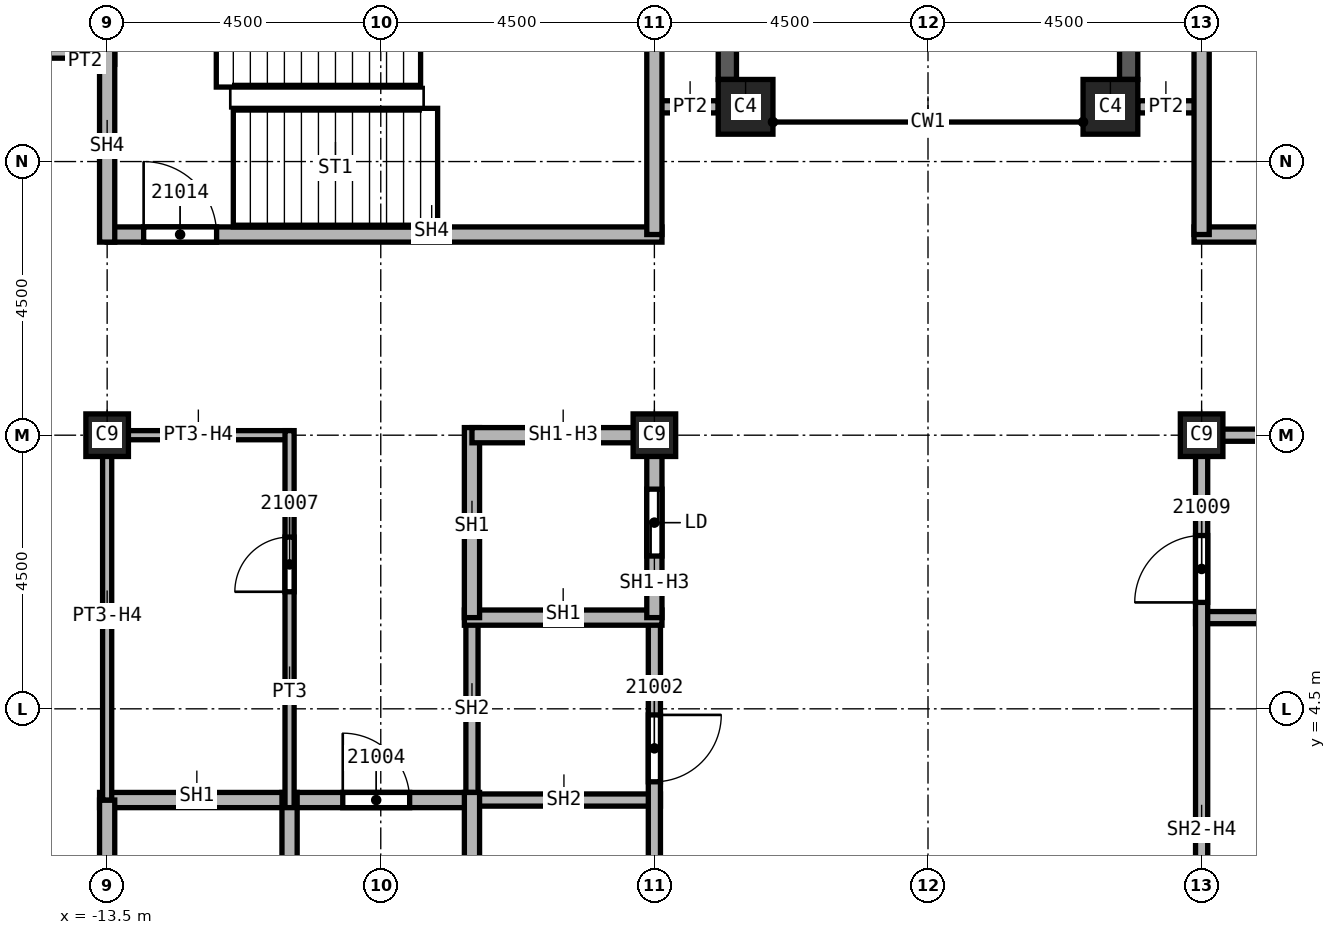
"""IFC4 building model, lengths in metres.
Left out: names, types, materials, properties, quantities, classifications, styles, units other than length and angle.
Written with IfcOpenShell. Run it as: python <this file> out.ifc"""

import sys

from ifc_helpers import new_model, si_unit, direction, frame, frame_2d, origin, origin_2d, place, context, subcontext, project, spatial, rectangle, extrude, element, fill, save


model = new_model("IFC4")
c1 = context("Model", 3, precision=1e-05, world=origin(), true_north=direction((0.0, 1.0)))
c2 = subcontext(c1, "Body", "Model", "MODEL_VIEW")
j1 = project(units=[si_unit("LENGTHUNIT", "METRE"), si_unit("PLANEANGLEUNIT", "RADIAN")], contexts=[c1])
p1 = place(None, origin())
s1 = spatial("IfcSite", under=j1, at=p1, CompositionType="ELEMENT")
p2 = place(p1, origin())
s2 = spatial("IfcBuilding", under=s1, at=p2, CompositionType="ELEMENT")
p3 = place(p2, frame((0.0, 0.0, 308.0)))
s3 = spatial("IfcBuildingStorey", under=s2, at=p3, CompositionType="ELEMENT", Elevation=308.0)
for number, where, z_axis, x_axis in (
    (1, (4.5, 9.0, 0.0), (0.0, 0.0, 1.0), (1.0, 0.0, 0.0)),
    (2, (-4.5, 9.0, 0.0), (0.0, 0.0, 1.0), (1.0, 0.0, 0.0)),
    (3, (-13.5, 9.0, 0.0), (0.0, 0.0, 1.0), (1.0, 0.0, 0.0)),
):
    element("IfcColumn", number, at=place(p3, frame(where, z_axis=z_axis, x_axis=x_axis)), inside=s3, PredefinedType="COLUMN", context=c2, shape_type="SweptSolid", body=[
        extrude(rectangle(XDim=0.7, YDim=0.7, at=origin_2d()), origin(), (0.0, 0.0, 1.0), 3.74),
    ])
for number, where, z_axis, x_axis in (
    (4, (3.0, 14.4, 0.0), (0.0, 0.0, 1.0), (1.0, 0.0, 0.0)),
    (5, (-3.0, 14.4, 0.0), (0.0, 0.0, 1.0), (1.0, 0.0, 0.0)),
):
    element("IfcColumn", number, at=place(p3, frame(where, z_axis=z_axis, x_axis=x_axis)), inside=s3, PredefinedType="COLUMN", context=c2, shape_type="SweptSolid", body=[
        extrude(rectangle(XDim=0.9, YDim=0.9, at=origin_2d()), origin(), (0.0, 0.0, 1.0), 3.74),
    ])
p4 = place(p3, frame((3.3, 22.95, 0.0), z_axis=(0.0, 0.0, 1.0), x_axis=(0.0, -1.0, 0.0)))
e6 = element("IfcWall", 6, at=p4, inside=s3, PredefinedType="SOLIDWALL", context=c2, shape_type="SweptSolid", body=[
    extrude(rectangle(XDim=8.1, YDim=0.3, at=frame_2d((4.05, 0.0))), origin(), (0.0, 0.0, 1.0), 3.14),
])
p5 = place(p4, frame((0.825, 0.0, 0.8)))
e7 = element("IfcOpeningElement", 7, at=p5, cuts=e6, PredefinedType="OPENING", context=c2, shape_type="SweptSolid", body=[
    extrude(rectangle(XDim=2.4, YDim=1.95, at=frame_2d((1.2, 0.975))), frame((0.0, 0.15, 0.0), z_axis=(0.0, -1.0, 0.0), x_axis=(1.0, 0.0, 0.0)), (0.0, 0.0, 1.0), 0.3),
])
p6 = place(p4, frame((4.875, 0.0, 0.8)))
e8 = element("IfcOpeningElement", 8, at=p6, cuts=e6, PredefinedType="OPENING", context=c2, shape_type="SweptSolid", body=[
    extrude(rectangle(XDim=2.4, YDim=1.95, at=frame_2d((1.2, 0.975))), frame((0.0, 0.15, 0.0), z_axis=(0.0, -1.0, 0.0), x_axis=(1.0, 0.0, 0.0)), (0.0, 0.0, 1.0), 0.3),
])
p7 = place(p3, frame((-3.3, 14.85, 0.0), z_axis=(0.0, 0.0, 1.0), x_axis=(0.0, 1.0, 0.0)))
e9 = element("IfcWall", 9, at=p7, inside=s3, PredefinedType="SOLIDWALL", context=c2, shape_type="SweptSolid", body=[
    extrude(rectangle(XDim=8.1, YDim=0.3, at=frame_2d((4.05, 0.0))), origin(), (0.0, 0.0, 1.0), 3.14),
])
p8 = place(p7, frame((0.825, 0.0, 0.8)))
e10 = element("IfcOpeningElement", 10, at=p8, cuts=e9, PredefinedType="OPENING", context=c2, shape_type="SweptSolid", body=[
    extrude(rectangle(XDim=2.4, YDim=1.95, at=frame_2d((1.2, 0.975))), frame((0.0, 0.15, 0.0), z_axis=(0.0, -1.0, 0.0), x_axis=(1.0, 0.0, 0.0)), (0.0, 0.0, 1.0), 0.3),
])
p9 = place(p7, frame((4.875, 0.0, 0.8)))
e11 = element("IfcOpeningElement", 11, at=p9, cuts=e9, PredefinedType="OPENING", context=c2, shape_type="SweptSolid", body=[
    extrude(rectangle(XDim=2.4, YDim=1.95, at=frame_2d((1.2, 0.975))), frame((0.0, 0.15, 0.0), z_axis=(0.0, -1.0, 0.0), x_axis=(1.0, 0.0, 0.0)), (0.0, 0.0, 1.0), 0.3),
])
p10 = place(p3, frame((-14.1, 15.2, 0.0), z_axis=(0.0, 0.0, 1.0), x_axis=(1.0, 0.0, 0.0)))
e12 = element("IfcWall", 12, at=p10, inside=s3, PredefinedType="PARTITIONING", context=c2, shape_type="SweptSolid", body=[
    extrude(rectangle(XDim=0.725, YDim=0.2, at=frame_2d((0.363, 0.0))), origin(), (0.0, 0.0, 1.0), 3.74),
])
for number, where, z_axis, x_axis in (
    (13, (-4.5, 14.4, 0.0), (0.0, 0.0, 1.0), (1.0, 0.0, 0.0)),
    (14, (3.45, 14.4, 0.0), (0.0, 0.0, 1.0), (1.0, 0.0, 0.0)),
):
    element("IfcWall", number, at=place(p3, frame(where, z_axis=z_axis, x_axis=x_axis)), inside=s3, PredefinedType="PARTITIONING", context=c2, shape_type="SweptSolid", body=[
        extrude(rectangle(XDim=1.05, YDim=0.2, at=frame_2d((0.525, 0.0))), origin(), (0.0, 0.0, 1.0), 3.74),
    ])
p11 = place(p3, frame((-7.625, 3.0, 0.0), z_axis=(0.0, 0.0, 1.0), x_axis=(1.0, 0.0, 0.0)))
e15 = element("IfcWall", 15, at=p11, inside=s3, PredefinedType="SOLIDWALL", context=c2, shape_type="SweptSolid", body=[
    extrude(rectangle(XDim=3.225, YDim=0.2, at=frame_2d((1.613, 0.0))), origin(), (0.0, 0.0, 1.0), 3.74),
])
p12 = place(p3, frame((-7.5, 2.875, 0.0), z_axis=(0.0, 0.0, 1.0), x_axis=(0.0, 1.0, 0.0)))
e16 = element("IfcWall", 16, at=p12, inside=s3, PredefinedType="SOLIDWALL", context=c2, shape_type="SweptSolid", body=[
    extrude(rectangle(XDim=3.125, YDim=0.2, at=frame_2d((1.562, 0.0))), origin(), (0.0, 0.0, 1.0), 3.74),
])
p13 = place(p3, frame((-4.5, 6.0, 0.0), z_axis=(0.0, 0.0, 1.0), x_axis=(0.0, -1.0, 0.0)))
e17 = element("IfcWall", 17, at=p13, inside=s3, PredefinedType="SOLIDWALL", context=c2, shape_type="SweptSolid", body=[
    extrude(rectangle(XDim=15.1, YDim=0.2, at=frame_2d((7.55, 0.0))), origin(), (0.0, 0.0, 1.0), 3.062),
])
p14 = place(p13, frame((6.85, 0.0, 0.0)))
e18 = element("IfcOpeningElement", 18, at=p14, cuts=e17, PredefinedType="OPENING", context=c2, shape_type="SweptSolid", body=[
    extrude(rectangle(XDim=1.1, YDim=2.1, at=frame_2d((0.55, 1.05))), frame((0.0, 0.1, 0.0), z_axis=(0.0, -1.0, 0.0), x_axis=(1.0, 0.0, 0.0)), (0.0, 0.0, 1.0), 0.2),
])
p15 = place(p13, frame((1.6, 0.0, 0.0)))
e19 = element("IfcOpeningElement", 19, at=p15, cuts=e17, PredefinedType="OPENING", context=c2, shape_type="SweptSolid", body=[
    extrude(rectangle(XDim=1.1, YDim=2.1, at=frame_2d((0.55, 1.05))), frame((0.0, 0.1, 0.0), z_axis=(0.0, -1.0, 0.0), x_axis=(1.0, 0.0, 0.0)), (0.0, 0.0, 1.0), 0.2),
])
p16 = place(p3, frame((4.4, 6.0, 0.0), z_axis=(0.0, 0.0, 1.0), x_axis=(1.0, 0.0, 0.0)))
e20 = element("IfcWall", 20, at=p16, inside=s3, PredefinedType="SOLIDWALL", context=c2, shape_type="SweptSolid", body=[
    extrude(rectangle(XDim=3.2, YDim=0.2, at=frame_2d((1.6, 0.0))), origin(), (0.0, 0.0, 1.0), 3.74),
])
p17 = place(p3, frame((4.5, -6.0, 0.0), z_axis=(0.0, 0.0, 1.0), x_axis=(0.0, 1.0, 0.0)))
e21 = element("IfcWall", 21, at=p17, inside=s3, PredefinedType="SOLIDWALL", context=c2, shape_type="SweptSolid", body=[
    extrude(rectangle(XDim=15.1, YDim=0.2, at=frame_2d((7.55, 0.0))), origin(), (0.0, 0.0, 1.0), 3.062),
])
p18 = place(p17, frame((4.0, 0.0, 0.0)))
e22 = element("IfcOpeningElement", 22, at=p18, cuts=e21, PredefinedType="OPENING", context=c2, shape_type="SweptSolid", body=[
    extrude(rectangle(XDim=1.1, YDim=2.1, at=frame_2d((0.55, 1.05))), frame((0.0, 0.1, 0.0), z_axis=(0.0, -1.0, 0.0), x_axis=(1.0, 0.0, 0.0)), (0.0, 0.0, 1.0), 0.2),
])
p19 = place(p17, frame((12.25, 0.0, 0.0)))
e23 = element("IfcOpeningElement", 23, at=p19, cuts=e21, PredefinedType="OPENING", context=c2, shape_type="SweptSolid", body=[
    extrude(rectangle(XDim=1.1, YDim=2.1, at=frame_2d((0.55, 1.05))), frame((0.0, 0.1, 0.0), z_axis=(0.0, -1.0, 0.0), x_axis=(1.0, 0.0, 0.0)), (0.0, 0.0, 1.0), 0.2),
])
p20 = place(p3, frame((4.5, 9.0, 0.0), z_axis=(0.0, 0.0, 1.0), x_axis=(1.0, 0.0, 0.0)))
e24 = element("IfcWall", 24, at=p20, inside=s3, PredefinedType="SOLIDWALL", context=c2, shape_type="SweptSolid", body=[
    extrude(rectangle(XDim=3.0, YDim=0.2, at=frame_2d((1.5, 0.0))), origin(), (0.0, 0.0, 1.0), 3.062),
])
p21 = place(p3, frame((-13.625, 3.0, 0.0), z_axis=(0.0, 0.0, 1.0), x_axis=(1.0, 0.0, 0.0)))
e25 = element("IfcWall", 25, at=p21, inside=s3, PredefinedType="SOLIDWALL", context=c2, shape_type="SweptSolid", body=[
    extrude(rectangle(XDim=6.125, YDim=0.25, at=frame_2d((3.062, 0.0))), origin(), (0.0, 0.0, 1.0), 3.74),
])
p22 = place(p21, frame((4.0, 0.0, 0.0)))
e26 = element("IfcOpeningElement", 26, at=p22, cuts=e25, PredefinedType="OPENING", context=c2, shape_type="SweptSolid", body=[
    extrude(rectangle(XDim=1.1, YDim=2.1, at=frame_2d((0.55, 1.05))), frame((0.0, 0.125, 0.0), z_axis=(0.0, -1.0, 0.0), x_axis=(1.0, 0.0, 0.0)), (0.0, 0.0, 1.0), 0.25),
])
p23 = place(p3, frame((-13.5, -3.0, 0.0), z_axis=(0.0, 0.0, 1.0), x_axis=(0.0, 1.0, 0.0)))
e27 = element("IfcWall", 27, at=p23, inside=s3, PredefinedType="SOLIDWALL", context=c2, shape_type="SweptSolid", body=[
    extrude(rectangle(XDim=6.0, YDim=0.25, at=frame_2d((3.0, 0.0))), origin(), (0.0, 0.0, 1.0), 3.062),
])
p24 = place(p3, frame((-10.5, -3.125, 0.0), z_axis=(0.0, 0.0, 1.0), x_axis=(0.0, 1.0, 0.0)))
e28 = element("IfcWall", 28, at=p24, inside=s3, PredefinedType="SOLIDWALL", context=c2, shape_type="SweptSolid", body=[
    extrude(rectangle(XDim=6.25, YDim=0.25, at=frame_2d((3.125, 0.0))), origin(), (0.0, 0.0, 1.0), 3.74),
])
p25 = place(p24, frame((1.075, 0.0, 0.0)))
e29 = element("IfcOpeningElement", 29, at=p25, cuts=e28, PredefinedType="OPENING", context=c2, shape_type="SweptSolid", body=[
    extrude(rectangle(XDim=1.1, YDim=2.1, at=frame_2d((0.55, 1.05))), frame((0.0, 0.125, 0.0), z_axis=(0.0, -1.0, 0.0), x_axis=(1.0, 0.0, 0.0)), (0.0, 0.0, 1.0), 0.25),
])
p26 = place(p24, frame((4.075, 0.0, 0.0)))
e30 = element("IfcOpeningElement", 30, at=p26, cuts=e28, PredefinedType="OPENING", context=c2, shape_type="SweptSolid", body=[
    extrude(rectangle(XDim=1.1, YDim=2.1, at=frame_2d((0.55, 1.05))), frame((0.0, 0.125, 0.0), z_axis=(0.0, -1.0, 0.0), x_axis=(1.0, 0.0, 0.0)), (0.0, 0.0, 1.0), 0.25),
])
p27 = place(p3, frame((-7.625, 6.0, 0.0), z_axis=(0.0, 0.0, 1.0), x_axis=(1.0, 0.0, 0.0)))
e31 = element("IfcWall", 31, at=p27, inside=s3, PredefinedType="SOLIDWALL", context=c2, shape_type="SweptSolid", body=[
    extrude(rectangle(XDim=3.25, YDim=0.25, at=frame_2d((1.625, 0.0))), origin(), (0.0, 0.0, 1.0), 3.74),
])
p28 = place(p3, frame((-7.5, -3.125, 0.0), z_axis=(0.0, 0.0, 1.0), x_axis=(0.0, 1.0, 0.0)))
e32 = element("IfcWall", 32, at=p28, inside=s3, PredefinedType="SOLIDWALL", context=c2, shape_type="SweptSolid", body=[
    extrude(rectangle(XDim=6.25, YDim=0.25, at=frame_2d((3.125, 0.0))), origin(), (0.0, 0.0, 1.0), 3.74),
])
p29 = place(p3, frame((-7.5, 6.0, 0.0), z_axis=(0.0, 0.0, 1.0), x_axis=(0.0, 1.0, 0.0)))
e33 = element("IfcWall", 33, at=p29, inside=s3, PredefinedType="SOLIDWALL", context=c2, shape_type="SweptSolid", body=[
    extrude(rectangle(XDim=3.125, YDim=0.25, at=frame_2d((1.562, 0.0))), origin(), (0.0, 0.0, 1.0), 3.74),
])
p30 = place(p3, frame((-7.5, 9.0, 0.0), z_axis=(0.0, 0.0, 1.0), x_axis=(1.0, 0.0, 0.0)))
e34 = element("IfcWall", 34, at=p30, inside=s3, PredefinedType="SOLIDWALL", context=c2, shape_type="SweptSolid", body=[
    extrude(rectangle(XDim=3.0, YDim=0.25, at=frame_2d((1.5, 0.0))), origin(), (0.0, 0.0, 1.0), 3.062),
])
p31 = place(p3, frame((-4.5, 9.125, 0.0), z_axis=(0.0, 0.0, 1.0), x_axis=(0.0, -1.0, 0.0)))
e35 = element("IfcWall", 35, at=p31, inside=s3, PredefinedType="SOLIDWALL", context=c2, shape_type="SweptSolid", body=[
    extrude(rectangle(XDim=3.125, YDim=0.25, at=frame_2d((1.562, 0.0))), origin(), (0.0, 0.0, 1.0), 3.062),
])
p32 = place(p31, frame((1.012, 0.0, 0.0)))
e36 = element("IfcOpeningElement", 36, at=p32, cuts=e35, PredefinedType="OPENING", context=c2, shape_type="SweptSolid", body=[
    extrude(rectangle(XDim=1.1, YDim=2.1, at=frame_2d((0.55, 1.05))), frame((0.0, 0.125, 0.0), z_axis=(0.0, -1.0, 0.0), x_axis=(1.0, 0.0, 0.0)), (0.0, 0.0, 1.0), 0.25),
])
p33 = place(p3, frame((-13.5, 12.3, 0.0), z_axis=(0.0, 0.0, 1.0), x_axis=(1.0, 0.0, 0.0)))
e37 = element("IfcWall", 37, at=p33, inside=s3, PredefinedType="SOLIDWALL", context=c2, shape_type="SweptSolid", body=[
    extrude(rectangle(XDim=9.125, YDim=0.25, at=frame_2d((4.562, 0.0))), origin(), (0.0, 0.0, 1.0), 3.74),
])
p34 = place(p33, frame((0.6, 0.0, 0.0)))
e38 = element("IfcOpeningElement", 38, at=p34, cuts=e37, PredefinedType="OPENING", context=c2, shape_type="SweptSolid", body=[
    extrude(rectangle(XDim=1.2, YDim=2.1, at=frame_2d((0.6, 1.05))), frame((0.0, 0.125, 0.0), z_axis=(0.0, -1.0, 0.0), x_axis=(1.0, 0.0, 0.0)), (0.0, 0.0, 1.0), 0.25),
])
p35 = place(p3, frame((-13.5, 12.175, 0.0), z_axis=(0.0, 0.0, 1.0), x_axis=(0.0, 1.0, 0.0)))
e39 = element("IfcWall", 39, at=p35, inside=s3, PredefinedType="SOLIDWALL", context=c2, shape_type="SweptSolid", body=[
    extrude(rectangle(XDim=4.75, YDim=0.25, at=frame_2d((2.375, 0.0))), origin(), (0.0, 0.0, 1.0), 3.74),
])
p36 = place(p3, frame((-4.5, 16.8, 0.0), z_axis=(0.0, 0.0, 1.0), x_axis=(0.0, -1.0, 0.0)))
e40 = element("IfcWall", 40, at=p36, inside=s3, PredefinedType="SOLIDWALL", context=c2, shape_type="SweptSolid", body=[
    extrude(rectangle(XDim=4.5, YDim=0.25, at=frame_2d((2.25, 0.0))), origin(), (0.0, 0.0, 1.0), 3.74),
])
p37 = place(p3, frame((4.375, 12.3, 0.0), z_axis=(0.0, 0.0, 1.0), x_axis=(1.0, 0.0, 0.0)))
e41 = element("IfcWall", 41, at=p37, inside=s3, PredefinedType="SOLIDWALL", context=c2, shape_type="SweptSolid", body=[
    extrude(rectangle(XDim=9.125, YDim=0.25, at=frame_2d((4.562, 0.0))), origin(), (0.0, 0.0, 1.0), 3.74),
])
p38 = place(p37, frame((7.2, 0.0, 0.0)))
e42 = element("IfcOpeningElement", 42, at=p38, cuts=e41, PredefinedType="OPENING", context=c2, shape_type="SweptSolid", body=[
    extrude(rectangle(XDim=1.2, YDim=2.1, at=frame_2d((0.6, 1.05))), frame((0.0, 0.125, 0.0), z_axis=(0.0, -1.0, 0.0), x_axis=(1.0, 0.0, 0.0)), (0.0, 0.0, 1.0), 0.25),
])
p39 = place(p3, frame((4.5, 12.3, 0.0), z_axis=(0.0, 0.0, 1.0), x_axis=(0.0, 1.0, 0.0)))
e43 = element("IfcWall", 43, at=p39, inside=s3, PredefinedType="SOLIDWALL", context=c2, shape_type="SweptSolid", body=[
    extrude(rectangle(XDim=4.5, YDim=0.25, at=frame_2d((2.25, 0.0))), origin(), (0.0, 0.0, 1.0), 3.74),
])
p40 = place(p3, frame((-13.5, 3.0, 0.0), z_axis=(0.0, 0.0, 1.0), x_axis=(0.0, 1.0, 0.0)))
e44 = element("IfcWall", 44, at=p40, inside=s3, PredefinedType="PARTITIONING", context=c2, shape_type="SweptSolid", body=[
    extrude(rectangle(XDim=6.075, YDim=0.15, at=frame_2d((3.038, 0.0))), origin(), (0.0, 0.0, 1.0), 3.062),
])
p41 = place(p3, frame((-13.5, 9.0, 0.0), z_axis=(0.0, 0.0, 1.0), x_axis=(1.0, 0.0, 0.0)))
e45 = element("IfcWall", 45, at=p41, inside=s3, PredefinedType="PARTITIONING", context=c2, shape_type="SweptSolid", body=[
    extrude(rectangle(XDim=3.0, YDim=0.15, at=frame_2d((1.5, 0.0))), origin(), (0.0, 0.0, 1.0), 3.062),
])
p42 = place(p3, frame((-10.5, 2.875, 0.0), z_axis=(0.0, 0.0, 1.0), x_axis=(0.0, 1.0, 0.0)))
e46 = element("IfcWall", 46, at=p42, inside=s3, PredefinedType="PARTITIONING", context=c2, shape_type="SweptSolid", body=[
    extrude(rectangle(XDim=6.2, YDim=0.15, at=frame_2d((3.1, 0.0))), origin(), (0.0, 0.0, 1.0), 3.74),
])
p43 = place(p42, frame((3.55, 0.0, 0.0)))
e47 = element("IfcOpeningElement", 47, at=p43, cuts=e46, PredefinedType="OPENING", context=c2, shape_type="SweptSolid", body=[
    extrude(rectangle(XDim=0.9, YDim=2.1, at=frame_2d((0.45, 1.05))), frame((0.0, 0.075, 0.0), z_axis=(0.0, -1.0, 0.0), x_axis=(1.0, 0.0, 0.0)), (0.0, 0.0, 1.0), 0.15),
])
p44 = place(p3, frame((-21.9, 15.3, 0.0), z_axis=(0.0, 0.0, 1.0), x_axis=(1.0, 0.0, 0.0)))
e48 = element("IfcWall", 48, at=p44, inside=s3, PredefinedType="SOLIDWALL", context=c2, shape_type="SweptSolid", body=[
    extrude(rectangle(XDim=8.275, YDim=0.2, at=frame_2d((4.137, 0.0))), origin(), (0.0, 0.0, 1.0), 3.74),
])
p45 = place(p44, frame((4.8, 0.0, 0.0)))
e49 = element("IfcOpeningElement", 49, at=p45, cuts=e48, PredefinedType="OPENING", context=c2, shape_type="SweptSolid", body=[
    extrude(rectangle(XDim=1.2, YDim=2.1, at=frame_2d((0.6, 1.05))), frame((0.0, 0.1, 0.0), z_axis=(0.0, -1.0, 0.0), x_axis=(1.0, 0.0, 0.0)), (0.0, 0.0, 1.0), 0.2),
])
p46 = place(p15, origin())
e50 = element("IfcDoor", 50, at=p46, inside=s3, OperationType="SINGLE_SWING_LEFT", PredefinedType="DOOR", context=c2, shape_type="SweptSolid", body=[
    extrude(rectangle(XDim=1.1, YDim=2.1, at=frame_2d((0.55, 1.05))), frame((0.0, 0.025, 0.0), z_axis=(0.0, -1.0, 0.0), x_axis=(1.0, 0.0, 0.0)), (0.0, 0.0, 1.0), 0.05),
])
fill(e19, e50)
p47 = place(p22, origin())
e51 = element("IfcDoor", 51, at=p47, inside=s3, OperationType="SINGLE_SWING_LEFT", PredefinedType="DOOR", context=c2, shape_type="SweptSolid", body=[
    extrude(rectangle(XDim=1.1, YDim=2.1, at=frame_2d((0.55, 1.05))), frame((0.0, 0.025, 0.0), z_axis=(0.0, -1.0, 0.0), x_axis=(1.0, 0.0, 0.0)), (0.0, 0.0, 1.0), 0.05),
])
fill(e26, e51)
p48 = place(p43, origin())
e52 = element("IfcDoor", 52, at=p48, inside=s3, OperationType="SINGLE_SWING_RIGHT", PredefinedType="DOOR", context=c2, shape_type="SweptSolid", body=[
    extrude(rectangle(XDim=0.9, YDim=2.1, at=frame_2d((0.45, 1.05))), frame((0.0, 0.025, 0.0), z_axis=(0.0, -1.0, 0.0), x_axis=(1.0, 0.0, 0.0)), (0.0, 0.0, 1.0), 0.05),
])
fill(e47, e52)
p49 = place(p19, origin())
e53 = element("IfcDoor", 53, at=p49, inside=s3, OperationType="SINGLE_SWING_RIGHT", PredefinedType="DOOR", context=c2, shape_type="SweptSolid", body=[
    extrude(rectangle(XDim=1.1, YDim=2.1, at=frame_2d((0.55, 1.05))), frame((0.0, 0.025, 0.0), z_axis=(0.0, -1.0, 0.0), x_axis=(1.0, 0.0, 0.0)), (0.0, 0.0, 1.0), 0.05),
])
fill(e23, e53)
p50 = place(p34, origin())
e54 = element("IfcDoor", 54, at=p50, inside=s3, OperationType="SINGLE_SWING_LEFT", PredefinedType="DOOR", context=c2, shape_type="SweptSolid", body=[
    extrude(rectangle(XDim=1.2, YDim=2.1, at=frame_2d((0.6, 1.05))), frame((0.0, 0.025, 0.0), z_axis=(0.0, -1.0, 0.0), x_axis=(1.0, 0.0, 0.0)), (0.0, 0.0, 1.0), 0.05),
])
fill(e38, e54)
p51 = place(p32, origin())
e55 = element("IfcDoor", 55, at=p51, inside=s3, OperationType="SLIDING_TO_LEFT", PredefinedType="DOOR", context=c2, shape_type="SweptSolid", body=[
    extrude(rectangle(XDim=1.1, YDim=2.1, at=frame_2d((0.55, 1.05))), frame((0.0, 0.025, 0.0), z_axis=(0.0, -1.0, 0.0), x_axis=(1.0, 0.0, 0.0)), (0.0, 0.0, 1.0), 0.05),
])
fill(e36, e55)
save(model, sys.argv[1])
